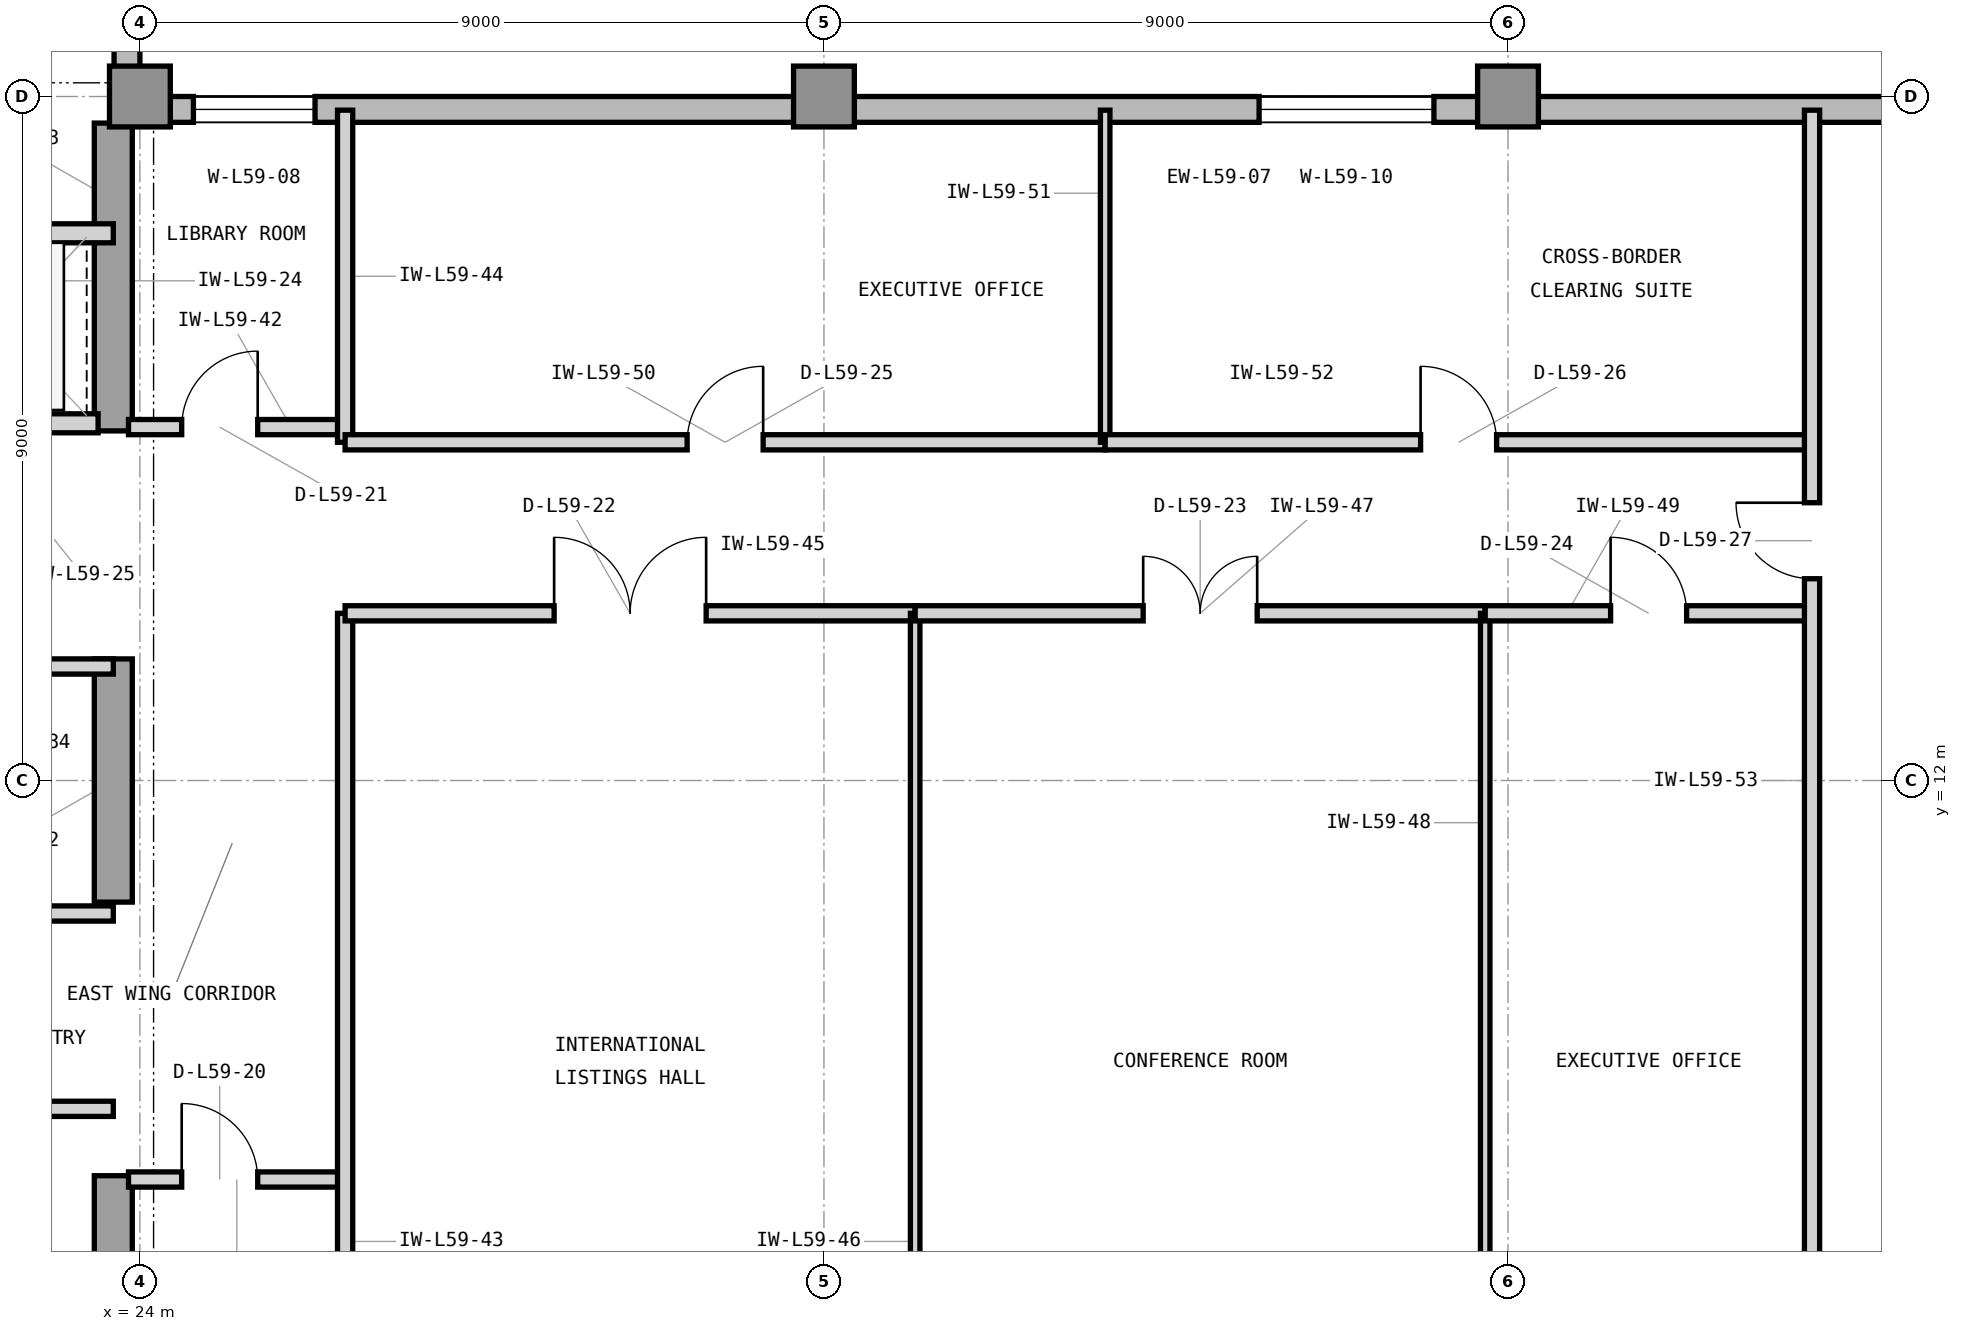
"""IFC4 building model, lengths in metres.
Left out: names, types, materials, properties, quantities, classifications, styles, units other than length and angle.
Written with IfcOpenShell. Run it as: python <this file> out.ifc"""

import sys

from ifc_helpers import new_model, si_unit, direction, frame, frame_2d, origin, origin_2d, place, context, subcontext, project, spatial, rectangle, extrude, element, fill, save


model = new_model("IFC4")
c1 = context("Model", 3, precision=1e-05, world=origin(), true_north=direction((0.0, 1.0)))
c2 = subcontext(c1, "Body", "Model", "MODEL_VIEW")
j1 = project(units=[si_unit("LENGTHUNIT", "METRE"), si_unit("PLANEANGLEUNIT", "RADIAN")], contexts=[c1])
p1 = place(None, origin())
s1 = spatial("IfcSite", under=j1, at=p1, CompositionType="ELEMENT")
p2 = place(p1, origin())
s2 = spatial("IfcBuilding", under=s1, at=p2, CompositionType="ELEMENT")
p3 = place(p2, frame((0.0, 0.0, 243.0)))
s3 = spatial("IfcBuildingStorey", under=s2, at=p3, CompositionType="ELEMENT", Elevation=243.0)
p4 = place(p3, frame((23.65, 3.6, 0.0), z_axis=(0.0, 0.0, 1.0), x_axis=(0.0, 1.0, 0.0)))
e1 = element("IfcWall", 1, at=p4, inside=s3, PredefinedType="SHEAR", context=c2, shape_type="SweptSolid", body=[
    extrude(rectangle(XDim=3.2, YDim=0.5, at=frame_2d((1.6, 0.0))), origin(), (0.0, 0.0, 1.0), 3.9),
])
p5 = place(p3, frame((23.65, 10.4, 0.0), z_axis=(0.0, 0.0, 1.0), x_axis=(0.0, 1.0, 0.0)))
e2 = element("IfcWall", 2, at=p5, inside=s3, PredefinedType="SHEAR", context=c2, shape_type="SweptSolid", body=[
    extrude(rectangle(XDim=3.2, YDim=0.5, at=frame_2d((1.6, 0.0))), origin(), (0.0, 0.0, 1.0), 3.9),
])
p6 = place(p3, frame((23.65, 16.6, 0.0), z_axis=(0.0, 0.0, 1.0), x_axis=(0.0, 1.0, 0.0)))
e3 = element("IfcWall", 3, at=p6, inside=s3, PredefinedType="SHEAR", context=c2, shape_type="SweptSolid", body=[
    extrude(rectangle(XDim=4.05, YDim=0.5, at=frame_2d((2.025, 0.0))), origin(), (0.0, 0.0, 1.0), 3.9),
])
for number, where, z_axis, x_axis in (
    (4, (24.0, 21.0, 0.0), (0.0, 0.0, 1.0), (1.0, 0.0, 0.0)),
    (5, (33.0, 21.0, 0.0), (0.0, 0.0, 1.0), (1.0, 0.0, 0.0)),
    (6, (42.0, 21.0, 0.0), (0.0, 0.0, 1.0), (1.0, 0.0, 0.0)),
):
    element("IfcColumn", number, at=place(p3, frame(where, z_axis=z_axis, x_axis=x_axis)), inside=s3, PredefinedType="COLUMN", context=c2, shape_type="SweptSolid", body=[
        extrude(rectangle(XDim=0.8, YDim=0.8, at=origin_2d()), origin(), (0.0, 0.0, 1.0), 3.9),
    ])
p7 = place(p3, frame((52.4, 20.83, 0.0), z_axis=(0.0, 0.0, 1.0), x_axis=(-1.0, 0.0, 0.0)))
e7 = element("IfcWall", 7, at=p7, inside=s3, PredefinedType="STANDARD", context=c2, shape_type="SweptSolid", body=[
    extrude(rectangle(XDim=28.4, YDim=0.34, at=frame_2d((14.2, 0.0))), origin(), (0.0, 0.0, 1.0), 3.7),
])
p8 = place(p7, frame((26.096, 0.0, 0.9)))
e8 = element("IfcOpeningElement", 8, at=p8, cuts=e7, PredefinedType="OPENING", context=c2, shape_type="SweptSolid", body=[
    extrude(rectangle(XDim=1.6, YDim=2.2, at=frame_2d((0.8, 1.1))), frame((0.0, 0.18, 0.0), z_axis=(0.0, -1.0, 0.0), x_axis=(1.0, 0.0, 0.0)), (0.0, 0.0, 1.0), 0.36),
])
p9 = place(p7, frame((11.375, 0.0, 0.9)))
e9 = element("IfcOpeningElement", 9, at=p9, cuts=e7, PredefinedType="OPENING", context=c2, shape_type="SweptSolid", body=[
    extrude(rectangle(XDim=2.3, YDim=2.2, at=frame_2d((1.15, 1.1))), frame((0.0, 0.18, 0.0), z_axis=(0.0, -1.0, 0.0), x_axis=(1.0, 0.0, 0.0)), (0.0, 0.0, 1.0), 0.36),
])
p10 = place(p3, frame((23.83, 21.0, 0.0), z_axis=(0.0, 0.0, 1.0), x_axis=(0.0, 1.0, 0.0)))
e10 = element("IfcWall", 10, at=p10, inside=s3, PredefinedType="STANDARD", context=c2, shape_type="SweptSolid", body=[
    extrude(rectangle(XDim=19.4, YDim=0.34, at=frame_2d((9.7, 0.0))), origin(), (0.0, 0.0, 1.0), 3.7),
])
p11 = place(p10, frame((10.975, 0.0, 0.9)))
e11 = element("IfcOpeningElement", 11, at=p11, cuts=e10, PredefinedType="OPENING", context=c2, shape_type="SweptSolid", body=[
    extrude(rectangle(XDim=2.3, YDim=2.2, at=frame_2d((1.15, 1.1))), frame((0.0, 0.18, 0.0), z_axis=(0.0, -1.0, 0.0), x_axis=(1.0, 0.0, 0.0)), (0.0, 0.0, 1.0), 0.36),
])
p12 = place(p3, frame((21.05, 16.7, 0.0), z_axis=(0.0, 0.0, 1.0), x_axis=(1.0, 0.0, 0.0)))
e12 = element("IfcWall", 12, at=p12, inside=s3, PredefinedType="PARTITIONING", context=c2, shape_type="SweptSolid", body=[
    extrude(rectangle(XDim=2.4, YDim=0.25, at=frame_2d((1.2, 0.0))), origin(), (0.0, 0.0, 1.0), 3.073),
])
p13 = place(p12, frame((0.52, 0.0, 0.0)))
e13 = element("IfcOpeningElement", 13, at=p13, cuts=e12, PredefinedType="OPENING", context=c2, shape_type="SweptSolid", body=[
    extrude(rectangle(XDim=1.15, YDim=2.25, at=frame_2d((0.575, 1.125))), frame((0.0, 0.135, 0.0), z_axis=(0.0, -1.0, 0.0), x_axis=(1.0, 0.0, 0.0)), (0.0, 0.0, 1.0), 0.27),
])
p14 = place(p3, frame((16.45, 19.2, 0.0), z_axis=(0.0, 0.0, 1.0), x_axis=(1.0, 0.0, 0.0)))
e14 = element("IfcWall", 14, at=p14, inside=s3, PredefinedType="PARTITIONING", context=c2, shape_type="SweptSolid", body=[
    extrude(rectangle(XDim=7.2, YDim=0.25, at=frame_2d((3.6, 0.0))), origin(), (0.0, 0.0, 1.0), 3.69),
])
p15 = place(p3, frame((20.55, 7.68, 0.0), z_axis=(0.0, 0.0, 1.0), x_axis=(1.0, 0.0, 0.0)))
e15 = element("IfcWall", 15, at=p15, inside=s3, PredefinedType="PARTITIONING", context=c2, shape_type="SweptSolid", body=[
    extrude(rectangle(XDim=3.1, YDim=0.2, at=frame_2d((1.55, 0.0))), origin(), (0.0, 0.0, 1.0), 3.69),
])
p16 = place(p15, frame((1.075, 0.0, 0.0)))
e16 = element("IfcOpeningElement", 16, at=p16, cuts=e15, PredefinedType="OPENING", context=c2, shape_type="SweptSolid", body=[
    extrude(rectangle(XDim=0.95, YDim=2.1, at=frame_2d((0.475, 1.05))), frame((0.0, 0.11, 0.0), z_axis=(0.0, -1.0, 0.0), x_axis=(1.0, 0.0, 0.0)), (0.0, 0.0, 1.0), 0.22),
])
p17 = place(p3, frame((14.825, 10.25, 0.0), z_axis=(0.0, 0.0, 1.0), x_axis=(1.0, 0.0, 0.0)))
e17 = element("IfcWall", 17, at=p17, inside=s3, PredefinedType="PARTITIONING", context=c2, shape_type="SweptSolid", body=[
    extrude(rectangle(XDim=8.825, YDim=0.2, at=frame_2d((4.413, 0.0))), origin(), (0.0, 0.0, 1.0), 3.69),
])
p18 = place(p3, frame((18.45, 13.5, 0.0), z_axis=(0.0, 0.0, 1.0), x_axis=(1.0, 0.0, 0.0)))
e18 = element("IfcWall", 18, at=p18, inside=s3, PredefinedType="PARTITIONING", context=c2, shape_type="SweptSolid", body=[
    extrude(rectangle(XDim=5.2, YDim=0.2, at=frame_2d((2.6, 0.0))), origin(), (0.0, 0.0, 1.0), 3.073),
])
p19 = place(p18, frame((2.125, 0.0, 0.0)))
e19 = element("IfcOpeningElement", 19, at=p19, cuts=e18, PredefinedType="OPENING", context=c2, shape_type="SweptSolid", body=[
    extrude(rectangle(XDim=0.95, YDim=2.1, at=frame_2d((0.475, 1.05))), frame((0.0, 0.11, 0.0), z_axis=(0.0, -1.0, 0.0), x_axis=(1.0, 0.0, 0.0)), (0.0, 0.0, 1.0), 0.22),
])
p20 = place(p3, frame((23.85, 6.75, 0.0), z_axis=(0.0, 0.0, 1.0), x_axis=(1.0, 0.0, 0.0)))
e20 = element("IfcWall", 20, at=p20, inside=s3, PredefinedType="PARTITIONING", context=c2, shape_type="SweptSolid", body=[
    extrude(rectangle(XDim=2.85, YDim=0.2, at=frame_2d((1.425, 0.0))), origin(), (0.0, 0.0, 1.0), 3.69),
])
p21 = place(p20, frame((0.7, 0.0, 0.0)))
e21 = element("IfcOpeningElement", 21, at=p21, cuts=e20, PredefinedType="OPENING", context=c2, shape_type="SweptSolid", body=[
    extrude(rectangle(XDim=1.0, YDim=2.15, at=frame_2d((0.5, 1.075))), frame((0.0, 0.11, 0.0), z_axis=(0.0, -1.0, 0.0), x_axis=(1.0, 0.0, 0.0)), (0.0, 0.0, 1.0), 0.22),
])
p22 = place(p3, frame((23.85, 16.65, 0.0), z_axis=(0.0, 0.0, 1.0), x_axis=(1.0, 0.0, 0.0)))
e22 = element("IfcWall", 22, at=p22, inside=s3, PredefinedType="PARTITIONING", context=c2, shape_type="SweptSolid", body=[
    extrude(rectangle(XDim=2.85, YDim=0.2, at=frame_2d((1.425, 0.0))), origin(), (0.0, 0.0, 1.0), 3.69),
])
p23 = place(p22, frame((0.7, 0.0, 0.0)))
e23 = element("IfcOpeningElement", 23, at=p23, cuts=e22, PredefinedType="OPENING", context=c2, shape_type="SweptSolid", body=[
    extrude(rectangle(XDim=1.0, YDim=2.15, at=frame_2d((0.5, 1.075))), frame((0.0, 0.11, 0.0), z_axis=(0.0, -1.0, 0.0), x_axis=(1.0, 0.0, 0.0)), (0.0, 0.0, 1.0), 0.22),
])
p24 = place(p3, frame((26.7, 3.18, 0.0), z_axis=(0.0, 0.0, 1.0), x_axis=(0.0, 1.0, 0.0)))
e24 = element("IfcWall", 24, at=p24, inside=s3, PredefinedType="PARTITIONING", context=c2, shape_type="SweptSolid", body=[
    extrude(rectangle(XDim=11.02, YDim=0.2, at=frame_2d((5.51, 0.0))), origin(), (0.0, 0.0, 1.0), 3.69),
])
p25 = place(p3, frame((26.7, 16.45, 0.0), z_axis=(0.0, 0.0, 1.0), x_axis=(0.0, 1.0, 0.0)))
e25 = element("IfcWall", 25, at=p25, inside=s3, PredefinedType="PARTITIONING", context=c2, shape_type="SweptSolid", body=[
    extrude(rectangle(XDim=4.37, YDim=0.2, at=frame_2d((2.185, 0.0))), origin(), (0.0, 0.0, 1.0), 3.69),
])
p26 = place(p3, frame((26.7, 14.2, 0.0), z_axis=(0.0, 0.0, 1.0), x_axis=(1.0, 0.0, 0.0)))
e26 = element("IfcWall", 26, at=p26, inside=s3, PredefinedType="PARTITIONING", context=c2, shape_type="SweptSolid", body=[
    extrude(rectangle(XDim=7.5, YDim=0.2, at=frame_2d((3.75, 0.0))), origin(), (0.0, 0.0, 1.0), 3.69),
])
p27 = place(p26, frame((2.75, 0.0, 0.0)))
e27 = element("IfcOpeningElement", 27, at=p27, cuts=e26, PredefinedType="OPENING", context=c2, shape_type="SweptSolid", body=[
    extrude(rectangle(XDim=2.0, YDim=2.5, at=frame_2d((1.0, 1.25))), frame((0.0, 0.11, 0.0), z_axis=(0.0, -1.0, 0.0), x_axis=(1.0, 0.0, 0.0)), (0.0, 0.0, 1.0), 0.22),
])
p28 = place(p3, frame((34.2, 3.18, 0.0), z_axis=(0.0, 0.0, 1.0), x_axis=(0.0, 1.0, 0.0)))
e28 = element("IfcWall", 28, at=p28, inside=s3, PredefinedType="PARTITIONING", context=c2, shape_type="SweptSolid", body=[
    extrude(rectangle(XDim=11.02, YDim=0.125, at=frame_2d((5.51, 0.0))), origin(), (0.0, 0.0, 1.0), 3.69),
])
p29 = place(p3, frame((34.2, 14.2, 0.0), z_axis=(0.0, 0.0, 1.0), x_axis=(1.0, 0.0, 0.0)))
e29 = element("IfcWall", 29, at=p29, inside=s3, PredefinedType="PARTITIONING", context=c2, shape_type="SweptSolid", body=[
    extrude(rectangle(XDim=7.5, YDim=0.2, at=frame_2d((3.75, 0.0))), origin(), (0.0, 0.0, 1.0), 3.69),
])
p30 = place(p29, frame((3.0, 0.0, 0.0)))
e30 = element("IfcOpeningElement", 30, at=p30, cuts=e29, PredefinedType="OPENING", context=c2, shape_type="SweptSolid", body=[
    extrude(rectangle(XDim=1.5, YDim=2.3, at=frame_2d((0.75, 1.15))), frame((0.0, 0.11, 0.0), z_axis=(0.0, -1.0, 0.0), x_axis=(1.0, 0.0, 0.0)), (0.0, 0.0, 1.0), 0.22),
])
p31 = place(p3, frame((41.7, 3.18, 0.0), z_axis=(0.0, 0.0, 1.0), x_axis=(0.0, 1.0, 0.0)))
e31 = element("IfcWall", 31, at=p31, inside=s3, PredefinedType="PARTITIONING", context=c2, shape_type="SweptSolid", body=[
    extrude(rectangle(XDim=11.02, YDim=0.125, at=frame_2d((5.51, 0.0))), origin(), (0.0, 0.0, 1.0), 3.69),
])
p32 = place(p3, frame((41.7, 14.2, 0.0), z_axis=(0.0, 0.0, 1.0), x_axis=(1.0, 0.0, 0.0)))
e32 = element("IfcWall", 32, at=p32, inside=s3, PredefinedType="PARTITIONING", context=c2, shape_type="SweptSolid", body=[
    extrude(rectangle(XDim=4.3, YDim=0.2, at=frame_2d((2.15, 0.0))), origin(), (0.0, 0.0, 1.0), 3.69),
])
p33 = place(p32, frame((1.65, 0.0, 0.0)))
e33 = element("IfcOpeningElement", 33, at=p33, cuts=e32, PredefinedType="OPENING", context=c2, shape_type="SweptSolid", body=[
    extrude(rectangle(XDim=1.0, YDim=2.15, at=frame_2d((0.5, 1.075))), frame((0.0, 0.11, 0.0), z_axis=(0.0, -1.0, 0.0), x_axis=(1.0, 0.0, 0.0)), (0.0, 0.0, 1.0), 0.22),
])
p34 = place(p3, frame((26.7, 16.45, 0.0), z_axis=(0.0, 0.0, 1.0), x_axis=(1.0, 0.0, 0.0)))
e34 = element("IfcWall", 34, at=p34, inside=s3, PredefinedType="PARTITIONING", context=c2, shape_type="SweptSolid", body=[
    extrude(rectangle(XDim=10.0, YDim=0.2, at=frame_2d((5.0, 0.0))), origin(), (0.0, 0.0, 1.0), 3.69),
])
p35 = place(p34, frame((4.5, 0.0, 0.0)))
e35 = element("IfcOpeningElement", 35, at=p35, cuts=e34, PredefinedType="OPENING", context=c2, shape_type="SweptSolid", body=[
    extrude(rectangle(XDim=1.0, YDim=2.15, at=frame_2d((0.5, 1.075))), frame((0.0, 0.11, 0.0), z_axis=(0.0, -1.0, 0.0), x_axis=(1.0, 0.0, 0.0)), (0.0, 0.0, 1.0), 0.22),
])
p36 = place(p3, frame((36.7, 16.45, 0.0), z_axis=(0.0, 0.0, 1.0), x_axis=(0.0, 1.0, 0.0)))
e36 = element("IfcWall", 36, at=p36, inside=s3, PredefinedType="PARTITIONING", context=c2, shape_type="SweptSolid", body=[
    extrude(rectangle(XDim=4.37, YDim=0.125, at=frame_2d((2.185, 0.0))), origin(), (0.0, 0.0, 1.0), 3.69),
])
p37 = place(p3, frame((36.7, 16.45, 0.0), z_axis=(0.0, 0.0, 1.0), x_axis=(1.0, 0.0, 0.0)))
e37 = element("IfcWall", 37, at=p37, inside=s3, PredefinedType="PARTITIONING", context=c2, shape_type="SweptSolid", body=[
    extrude(rectangle(XDim=9.3, YDim=0.2, at=frame_2d((4.65, 0.0))), origin(), (0.0, 0.0, 1.0), 3.69),
])
p38 = place(p37, frame((4.15, 0.0, 0.0)))
e38 = element("IfcOpeningElement", 38, at=p38, cuts=e37, PredefinedType="OPENING", context=c2, shape_type="SweptSolid", body=[
    extrude(rectangle(XDim=1.0, YDim=2.15, at=frame_2d((0.5, 1.075))), frame((0.0, 0.11, 0.0), z_axis=(0.0, -1.0, 0.0), x_axis=(1.0, 0.0, 0.0)), (0.0, 0.0, 1.0), 0.22),
])
p39 = place(p3, frame((46.0, 3.18, 0.0), z_axis=(0.0, 0.0, 1.0), x_axis=(0.0, 1.0, 0.0)))
e39 = element("IfcWall", 39, at=p39, inside=s3, PredefinedType="PARTITIONING", context=c2, shape_type="SweptSolid", body=[
    extrude(rectangle(XDim=17.64, YDim=0.2, at=frame_2d((8.82, 0.0))), origin(), (0.0, 0.0, 1.0), 3.69),
])
p40 = place(p39, frame((11.475, 0.0, 0.0)))
e40 = element("IfcOpeningElement", 40, at=p40, cuts=e39, PredefinedType="OPENING", context=c2, shape_type="SweptSolid", body=[
    extrude(rectangle(XDim=1.0, YDim=2.15, at=frame_2d((0.5, 1.075))), frame((0.0, 0.11, 0.0), z_axis=(0.0, -1.0, 0.0), x_axis=(1.0, 0.0, 0.0)), (0.0, 0.0, 1.0), 0.22),
])
p41 = place(p21, origin())
e41 = element("IfcDoor", 41, at=p41, inside=s3, OperationType="SINGLE_SWING_LEFT", PredefinedType="DOOR", context=c2, shape_type="SweptSolid", body=[
    extrude(rectangle(XDim=1.0, YDim=2.15, at=frame_2d((0.5, 1.075))), frame((0.0, 0.025, 0.0), z_axis=(0.0, -1.0, 0.0), x_axis=(1.0, 0.0, 0.0)), (0.0, 0.0, 1.0), 0.05),
])
fill(e21, e41)
p42 = place(p23, origin())
e42 = element("IfcDoor", 42, at=p42, inside=s3, OperationType="SINGLE_SWING_RIGHT", PredefinedType="DOOR", context=c2, shape_type="SweptSolid", body=[
    extrude(rectangle(XDim=1.0, YDim=2.15, at=frame_2d((0.5, 1.075))), frame((0.0, 0.025, 0.0), z_axis=(0.0, -1.0, 0.0), x_axis=(1.0, 0.0, 0.0)), (0.0, 0.0, 1.0), 0.05),
])
fill(e23, e42)
p43 = place(p27, origin())
e43 = element("IfcDoor", 43, at=p43, inside=s3, OperationType="DOUBLE_DOOR_SINGLE_SWING", PredefinedType="DOOR", context=c2, shape_type="SweptSolid", body=[
    extrude(rectangle(XDim=2.0, YDim=2.5, at=frame_2d((1.0, 1.25))), frame((0.0, 0.025, 0.0), z_axis=(0.0, -1.0, 0.0), x_axis=(1.0, 0.0, 0.0)), (0.0, 0.0, 1.0), 0.05),
])
fill(e27, e43)
p44 = place(p30, origin())
e44 = element("IfcDoor", 44, at=p44, inside=s3, OperationType="DOUBLE_DOOR_SINGLE_SWING", PredefinedType="DOOR", context=c2, shape_type="SweptSolid", body=[
    extrude(rectangle(XDim=1.5, YDim=2.3, at=frame_2d((0.75, 1.15))), frame((0.0, 0.025, 0.0), z_axis=(0.0, -1.0, 0.0), x_axis=(1.0, 0.0, 0.0)), (0.0, 0.0, 1.0), 0.05),
])
fill(e30, e44)
p45 = place(p33, origin())
e45 = element("IfcDoor", 45, at=p45, inside=s3, OperationType="SINGLE_SWING_LEFT", PredefinedType="DOOR", context=c2, shape_type="SweptSolid", body=[
    extrude(rectangle(XDim=1.0, YDim=2.15, at=frame_2d((0.5, 1.075))), frame((0.0, 0.025, 0.0), z_axis=(0.0, -1.0, 0.0), x_axis=(1.0, 0.0, 0.0)), (0.0, 0.0, 1.0), 0.05),
])
fill(e33, e45)
p46 = place(p35, origin())
e46 = element("IfcDoor", 46, at=p46, inside=s3, OperationType="SINGLE_SWING_RIGHT", PredefinedType="DOOR", context=c2, shape_type="SweptSolid", body=[
    extrude(rectangle(XDim=1.0, YDim=2.15, at=frame_2d((0.5, 1.075))), frame((0.0, 0.025, 0.0), z_axis=(0.0, -1.0, 0.0), x_axis=(1.0, 0.0, 0.0)), (0.0, 0.0, 1.0), 0.05),
])
fill(e35, e46)
p47 = place(p38, origin())
e47 = element("IfcDoor", 47, at=p47, inside=s3, OperationType="SINGLE_SWING_LEFT", PredefinedType="DOOR", context=c2, shape_type="SweptSolid", body=[
    extrude(rectangle(XDim=1.0, YDim=2.15, at=frame_2d((0.5, 1.075))), frame((0.0, 0.025, 0.0), z_axis=(0.0, -1.0, 0.0), x_axis=(1.0, 0.0, 0.0)), (0.0, 0.0, 1.0), 0.05),
])
fill(e38, e47)
p48 = place(p40, origin())
e48 = element("IfcDoor", 48, at=p48, inside=s3, OperationType="SINGLE_SWING_RIGHT", PredefinedType="DOOR", context=c2, shape_type="SweptSolid", body=[
    extrude(rectangle(XDim=1.0, YDim=2.15, at=frame_2d((0.5, 1.075))), frame((0.0, 0.025, 0.0), z_axis=(0.0, -1.0, 0.0), x_axis=(1.0, 0.0, 0.0)), (0.0, 0.0, 1.0), 0.05),
])
fill(e40, e48)
p49 = place(p8, origin())
e49 = element("IfcWindow", 49, at=p49, inside=s3, PartitioningType="SINGLE_PANEL", PredefinedType="WINDOW", context=c2, shape_type="SweptSolid", body=[
    extrude(rectangle(XDim=1.6, YDim=2.2, at=frame_2d((0.8, 1.1))), frame((0.0, 0.11, 0.0), z_axis=(0.0, -1.0, 0.0), x_axis=(1.0, 0.0, 0.0)), (0.0, 0.0, 1.0), 0.06),
])
fill(e8, e49)
p50 = place(p9, origin())
e50 = element("IfcWindow", 50, at=p50, inside=s3, PartitioningType="SINGLE_PANEL", PredefinedType="WINDOW", context=c2, shape_type="SweptSolid", body=[
    extrude(rectangle(XDim=2.3, YDim=2.2, at=frame_2d((1.15, 1.1))), frame((0.0, 0.11, 0.0), z_axis=(0.0, -1.0, 0.0), x_axis=(1.0, 0.0, 0.0)), (0.0, 0.0, 1.0), 0.06),
])
fill(e9, e50)
save(model, sys.argv[1])
